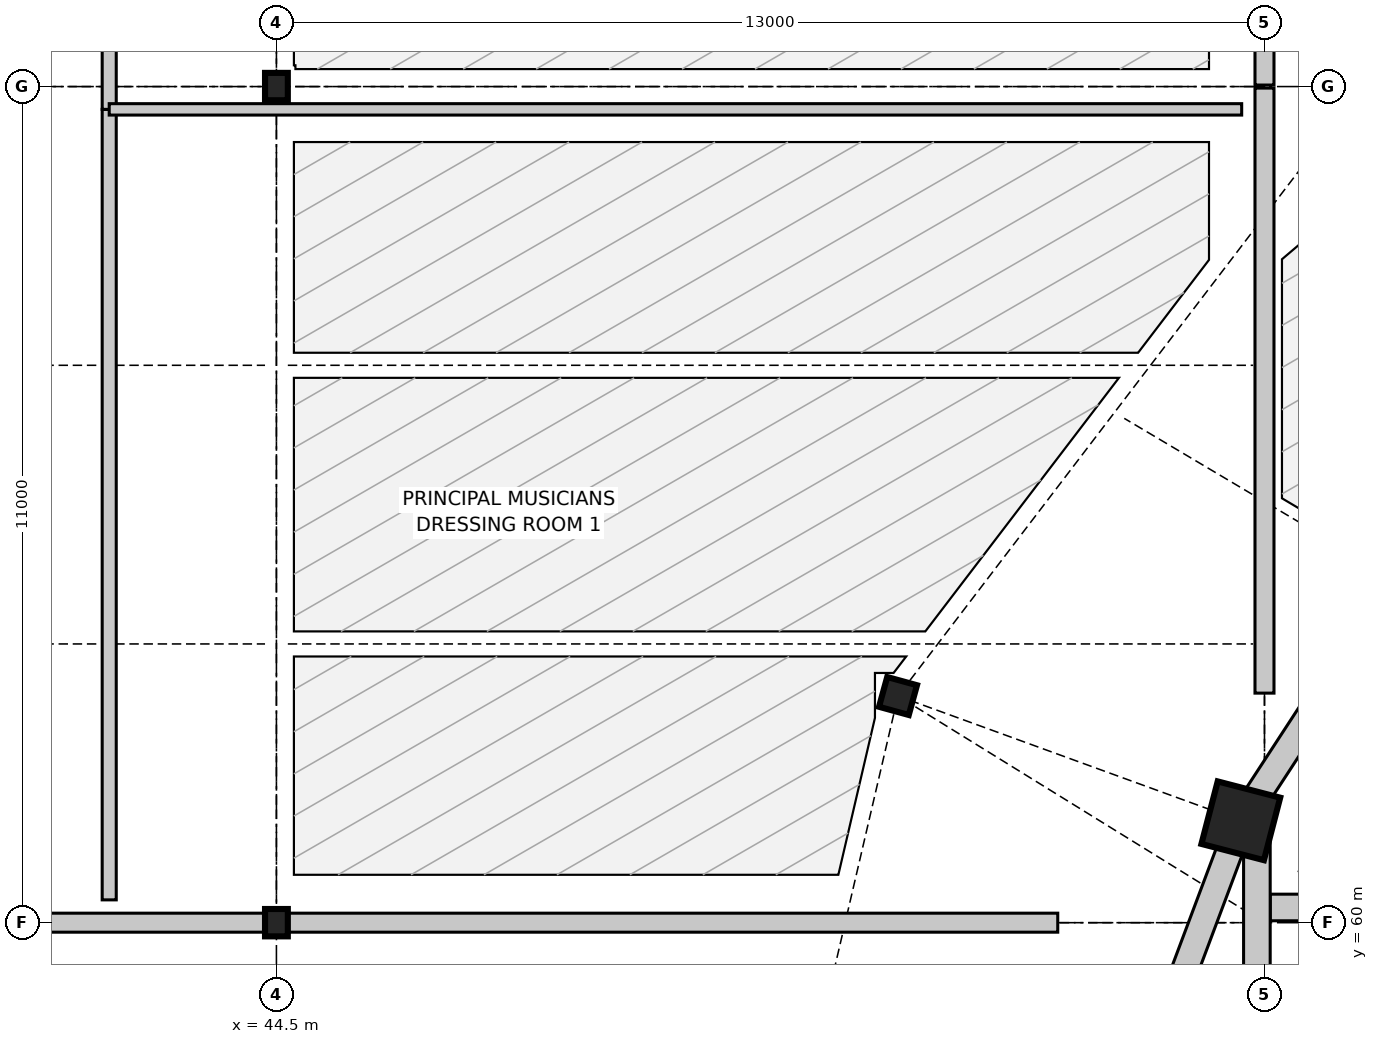
"""IFC4 building model, lengths in metres.
Left out: names, types, materials, properties, quantities, classifications, styles, units other than length and angle.
Written with IfcOpenShell. Run it as: python <this file> out.ifc"""

import sys

from ifc_helpers import new_model, si_unit, direction, frame, frame_2d, origin, origin_2d, place, context, subcontext, project, spatial, rectangle, hollow_circle, i_section, extrude, element, fill, save


model = new_model("IFC4")
c1 = context("Model", 3, precision=1e-05, world=origin(), true_north=direction((0.0, 1.0)))
c2 = subcontext(c1, "Body", "Model", "MODEL_VIEW")
j1 = project(units=[si_unit("LENGTHUNIT", "METRE"), si_unit("PLANEANGLEUNIT", "RADIAN")], contexts=[c1])
p1 = place(None, origin())
s1 = spatial("IfcSite", under=j1, at=p1, CompositionType="ELEMENT")
p2 = place(p1, origin())
s2 = spatial("IfcBuilding", under=s1, at=p2, CompositionType="ELEMENT")
p3 = place(p2, frame((0.0, 0.0, 4.8)))
s3 = spatial("IfcBuildingStorey", under=s2, at=p3, CompositionType="ELEMENT", Elevation=4.8)
p4 = place(p3, frame((52.678, 62.982, 0.0), z_axis=(0.0, 0.0, 1.0), x_axis=(-0.964141737836, 0.265387847052, 0.0)))
e1 = element("IfcColumn", 1, at=p4, inside=s3, PredefinedType="COLUMN", context=c2, shape_type="SweptSolid", body=[
    extrude(hollow_circle(Radius=0.203, WallThickness=0.025, at=origin_2d()), origin(), (0.0, 0.0, 1.0), 4.8),
])
p5 = place(p3, frame((57.189, 61.34, 0.0), z_axis=(0.0, 0.0, 1.0), x_axis=(-0.967841021032, 0.251562632376, 0.0)))
e2 = element("IfcColumn", 2, at=p5, inside=s3, PredefinedType="COLUMN", context=c2, shape_type="SweptSolid", body=[
    extrude(rectangle(XDim=0.85, YDim=0.85, at=origin_2d()), origin(), (0.0, 0.0, 1.0), 4.8),
])
for number, where, z_axis, x_axis in (
    (3, (44.5, 60.0, 0.0), (0.0, 0.0, 1.0), (1.0, 0.0, 0.0)),
    (4, (44.5, 71.0, 0.0), (0.0, 0.0, 1.0), (1.0, 0.0, 0.0)),
):
    element("IfcColumn", number, at=place(p3, frame(where, z_axis=z_axis, x_axis=x_axis)), inside=s3, PredefinedType="COLUMN", context=c2, shape_type="SweptSolid", body=[
        extrude(i_section(OverallWidth=0.3, OverallDepth=0.36, WebThickness=0.012, FlangeThickness=0.022, FilletRadius=0.027, at=origin_2d()), origin(), (0.0, 0.0, 1.0), 4.8),
    ])
p6 = place(p3, frame((59.251, 64.5, 0.0), z_axis=(0.0, 0.0, 1.0), x_axis=(-0.546611158382, -0.837386554425, 0.0)))
e5 = element("IfcWall", 5, at=p6, inside=s3, PredefinedType="SHEAR", context=c2, shape_type="SweptSolid", body=[
    extrude(rectangle(XDim=3.773, YDim=0.35, at=frame_2d((1.887, 0.0))), origin(), (0.0, 0.0, 1.0), 4.54),
])
p7 = place(p3, frame((57.189, 61.34, 0.0), z_axis=(0.0, 0.0, 1.0), x_axis=(-0.351279653979, -0.936270583058, 0.0)))
e6 = element("IfcWall", 6, at=p7, inside=s3, PredefinedType="SHEAR", context=c2, shape_type="SweptSolid", body=[
    extrude(rectangle(XDim=3.597, YDim=0.35, at=frame_2d((1.798, 0.0))), origin(), (0.0, 0.0, 1.0), 4.54),
])
p8 = place(p3, frame((44.48, 60.0, 0.0), z_axis=(0.0, 0.0, 1.0), x_axis=(-1.0, 0.0, 0.0)))
e7 = element("IfcWall", 7, at=p8, inside=s3, PredefinedType="SOLIDWALL", context=c2, shape_type="SweptSolid", body=[
    extrude(rectangle(XDim=12.96, YDim=0.25, at=frame_2d((6.48, 0.0))), origin(), (0.0, 0.0, 1.0), 3.878),
])
p9 = place(p8, frame((5.28, 0.0, 0.9)))
e8 = element("IfcOpeningElement", 8, at=p9, cuts=e7, PredefinedType="OPENING", context=c2, shape_type="SweptSolid", body=[
    extrude(rectangle(XDim=2.4, YDim=1.55, at=frame_2d((1.2, 0.775))), frame((0.0, 0.135, 0.0), z_axis=(0.0, -1.0, 0.0), x_axis=(1.0, 0.0, 0.0)), (0.0, 0.0, 1.0), 0.27),
])
p10 = place(p3, frame((54.78, 60.0, 0.0), z_axis=(0.0, 0.0, 1.0), x_axis=(-1.0, 0.0, 0.0)))
e9 = element("IfcWall", 9, at=p10, inside=s3, PredefinedType="SOLIDWALL", context=c2, shape_type="SweptSolid", body=[
    extrude(rectangle(XDim=10.26, YDim=0.25, at=frame_2d((5.13, 0.0))), origin(), (0.0, 0.0, 1.0), 4.078),
])
p11 = place(p10, frame((4.53, 0.0, 0.85)))
e10 = element("IfcOpeningElement", 10, at=p11, cuts=e9, PredefinedType="OPENING", context=c2, shape_type="SweptSolid", body=[
    extrude(rectangle(XDim=1.2, YDim=1.7, at=frame_2d((0.6, 0.85))), frame((0.0, 0.135, 0.0), z_axis=(0.0, -1.0, 0.0), x_axis=(1.0, 0.0, 0.0)), (0.0, 0.0, 1.0), 0.27),
])
p12 = place(p3, frame((57.5, 70.98, 0.0), z_axis=(0.0, 0.0, 1.0), x_axis=(0.0, -1.0, 0.0)))
e11 = element("IfcWall", 11, at=p12, inside=s3, PredefinedType="SOLIDWALL", context=c2, shape_type="SweptSolid", body=[
    extrude(rectangle(XDim=7.96, YDim=0.25, at=frame_2d((3.98, 0.0))), origin(), (0.0, 0.0, 1.0), 4.078),
])
p13 = place(p12, frame((3.28, 0.0, 0.85)))
e12 = element("IfcOpeningElement", 12, at=p13, cuts=e11, PredefinedType="OPENING", context=c2, shape_type="SweptSolid", body=[
    extrude(rectangle(XDim=1.4, YDim=1.7, at=frame_2d((0.7, 0.85))), frame((0.0, 0.135, 0.0), z_axis=(0.0, -1.0, 0.0), x_axis=(1.0, 0.0, 0.0)), (0.0, 0.0, 1.0), 0.27),
])
p14 = place(p3, frame((57.5, 81.98, 0.0), z_axis=(0.0, 0.0, 1.0), x_axis=(0.0, -1.0, 0.0)))
e13 = element("IfcWall", 13, at=p14, inside=s3, PredefinedType="SOLIDWALL", context=c2, shape_type="SweptSolid", body=[
    extrude(rectangle(XDim=10.96, YDim=0.25, at=frame_2d((5.48, 0.0))), origin(), (0.0, 0.0, 1.0), 4.078),
])
p15 = place(p14, frame((4.68, 0.0, 0.85)))
e14 = element("IfcOpeningElement", 14, at=p15, cuts=e13, PredefinedType="OPENING", context=c2, shape_type="SweptSolid", body=[
    extrude(rectangle(XDim=1.6, YDim=1.7, at=frame_2d((0.8, 0.85))), frame((0.0, 0.135, 0.0), z_axis=(0.0, -1.0, 0.0), x_axis=(1.0, 0.0, 0.0)), (0.0, 0.0, 1.0), 0.27),
])
p16 = place(p3, frame((57.575, 60.2, 0.0), z_axis=(0.0, 0.0, 1.0), x_axis=(1.0, 0.0, 0.0)))
e15 = element("IfcWall", 15, at=p16, inside=s3, PredefinedType="SHEAR", context=c2, shape_type="SweptSolid", body=[
    extrude(rectangle(XDim=6.45, YDim=0.35, at=frame_2d((3.225, 0.0))), origin(), (0.0, 0.0, 1.0), 4.54),
])
p17 = place(p16, frame((1.15, 0.0, 0.0)))
e16 = element("IfcOpeningElement", 16, at=p17, cuts=e15, PredefinedType="OPENING", context=c2, shape_type="SweptSolid", body=[
    extrude(rectangle(XDim=1.35, YDim=2.2, at=frame_2d((0.675, 1.1))), frame((0.0, 0.185, 0.0), z_axis=(0.0, -1.0, 0.0), x_axis=(1.0, 0.0, 0.0)), (0.0, 0.0, 1.0), 0.37),
])
p18 = place(p16, frame((5.28, 0.0, 0.0)))
e17 = element("IfcOpeningElement", 17, at=p18, cuts=e15, PredefinedType="OPENING", context=c2, shape_type="SweptSolid", body=[
    extrude(rectangle(XDim=0.95, YDim=2.12, at=frame_2d((0.475, 1.06))), frame((0.0, 0.185, 0.0), z_axis=(0.0, -1.0, 0.0), x_axis=(1.0, 0.0, 0.0)), (0.0, 0.0, 1.0), 0.37),
])
p19 = place(p3, frame((57.4, 48.775, 0.0), z_axis=(0.0, 0.0, 1.0), x_axis=(0.0, 1.0, 0.0)))
e18 = element("IfcWall", 18, at=p19, inside=s3, PredefinedType="SHEAR", context=c2, shape_type="SweptSolid", body=[
    extrude(rectangle(XDim=12.565, YDim=0.35, at=frame_2d((6.283, 0.0))), origin(), (0.0, 0.0, 1.0), 4.54),
])
p20 = place(p3, frame((42.3, 60.3, 0.0), z_axis=(0.0, 0.0, 1.0), x_axis=(0.0, 1.0, 0.0)))
e19 = element("IfcWall", 19, at=p20, inside=s3, PredefinedType="PARTITIONING", context=c2, shape_type="SweptSolid", body=[
    extrude(rectangle(XDim=10.4, YDim=0.185, at=frame_2d((5.2, 0.0))), origin(), (0.0, 0.0, 1.0), 3.73),
])
p21 = place(p20, frame((2.086, 0.0, 0.0)))
e20 = element("IfcOpeningElement", 20, at=p21, cuts=e19, PredefinedType="OPENING", context=c2, shape_type="SweptSolid", body=[
    extrude(rectangle(XDim=1.05, YDim=2.15, at=frame_2d((0.525, 1.075))), frame((0.0, 0.103, 0.0), z_axis=(0.0, -1.0, 0.0), x_axis=(1.0, 0.0, 0.0)), (0.0, 0.0, 1.0), 0.205),
])
p22 = place(p3, frame((42.3, 70.7, 0.0), z_axis=(0.0, 0.0, 1.0), x_axis=(0.0, 1.0, 0.0)))
e21 = element("IfcWall", 21, at=p22, inside=s3, PredefinedType="PARTITIONING", context=c2, shape_type="SweptSolid", body=[
    extrude(rectangle(XDim=10.5, YDim=0.185, at=frame_2d((5.25, 0.0))), origin(), (0.0, 0.0, 1.0), 3.73),
])
p23 = place(p3, frame((42.3, 70.7, 0.0), z_axis=(0.0, 0.0, 1.0), x_axis=(1.0, 0.0, 0.0)))
e22 = element("IfcWall", 22, at=p23, inside=s3, PredefinedType="PARTITIONING", context=c2, shape_type="SweptSolid", body=[
    extrude(rectangle(XDim=14.9, YDim=0.15, at=frame_2d((7.45, 0.0))), origin(), (0.0, 0.0, 1.0), 4.08),
])
p24 = place(p23, frame((6.925, 0.0, 0.0)))
e23 = element("IfcOpeningElement", 23, at=p24, cuts=e22, PredefinedType="OPENING", context=c2, shape_type="SweptSolid", body=[
    extrude(rectangle(XDim=1.05, YDim=2.15, at=frame_2d((0.525, 1.075))), frame((0.0, 0.085, 0.0), z_axis=(0.0, -1.0, 0.0), x_axis=(1.0, 0.0, 0.0)), (0.0, 0.0, 1.0), 0.17),
])
p25 = place(p11, origin())
e24 = element("IfcWindow", 24, at=p25, inside=s3, PartitioningType="SINGLE_PANEL", PredefinedType="WINDOW", context=c2, shape_type="SweptSolid", body=[
    extrude(rectangle(XDim=1.2, YDim=1.7, at=frame_2d((0.6, 0.85))), frame((0.0, 0.03, 0.0), z_axis=(0.0, -1.0, 0.0), x_axis=(1.0, 0.0, 0.0)), (0.0, 0.0, 1.0), 0.06),
])
fill(e10, e24)
p26 = place(p13, origin())
e25 = element("IfcWindow", 25, at=p26, inside=s3, PartitioningType="SINGLE_PANEL", PredefinedType="WINDOW", context=c2, shape_type="SweptSolid", body=[
    extrude(rectangle(XDim=1.4, YDim=1.7, at=frame_2d((0.7, 0.85))), frame((0.0, 0.03, 0.0), z_axis=(0.0, -1.0, 0.0), x_axis=(1.0, 0.0, 0.0)), (0.0, 0.0, 1.0), 0.06),
])
fill(e12, e25)
p27 = place(p21, origin())
e26 = element("IfcDoor", 26, at=p27, inside=s3, OperationType="SINGLE_SWING_LEFT", PredefinedType="DOOR", context=c2, shape_type="SweptSolid", body=[
    extrude(rectangle(XDim=1.05, YDim=2.15, at=frame_2d((0.525, 1.075))), frame((0.0, 0.025, 0.0), z_axis=(0.0, -1.0, 0.0), x_axis=(1.0, 0.0, 0.0)), (0.0, 0.0, 1.0), 0.05),
])
fill(e20, e26)
p28 = place(p24, origin())
e27 = element("IfcDoor", 27, at=p28, inside=s3, OperationType="SINGLE_SWING_RIGHT", PredefinedType="DOOR", context=c2, shape_type="SweptSolid", body=[
    extrude(rectangle(XDim=1.05, YDim=2.15, at=frame_2d((0.525, 1.075))), frame((0.0, 0.025, 0.0), z_axis=(0.0, -1.0, 0.0), x_axis=(1.0, 0.0, 0.0)), (0.0, 0.0, 1.0), 0.05),
])
fill(e23, e27)
save(model, sys.argv[1])
